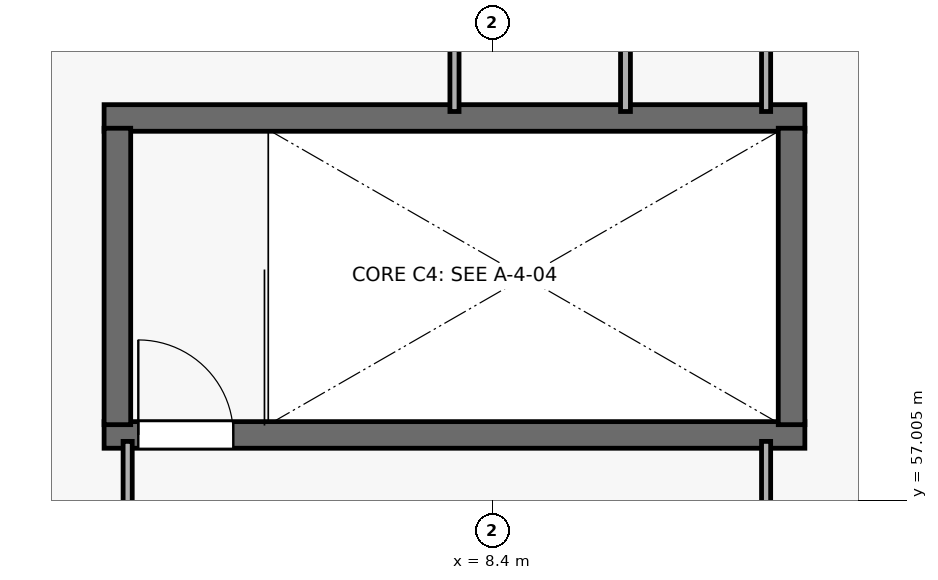
"""IFC4 building model, lengths in metres.
Left out: names, types, materials, properties, quantities, classifications, styles, units other than length and angle.
Written with IfcOpenShell. Run it as: python <this file> out.ifc"""

import sys

from ifc_helpers import new_model, si_unit, direction, frame, frame_2d, origin, place, context, subcontext, project, spatial, rectangle, extrude, element, fill, save


model = new_model("IFC4")
c1 = context("Model", 3, precision=1e-05, world=origin(), true_north=direction((0.0, 1.0)))
c2 = subcontext(c1, "Body", "Model", "MODEL_VIEW")
j1 = project(units=[si_unit("LENGTHUNIT", "METRE"), si_unit("PLANEANGLEUNIT", "RADIAN")], contexts=[c1])
p1 = place(None, origin())
s1 = spatial("IfcSite", under=j1, at=p1, CompositionType="ELEMENT")
p2 = place(p1, origin())
s2 = spatial("IfcBuilding", under=s1, at=p2, CompositionType="ELEMENT")
p3 = place(p2, frame((0.0, 0.0, 25.5)))
s3 = spatial("IfcBuildingStorey", under=s2, at=p3, CompositionType="ELEMENT", Elevation=25.5)
p4 = place(p3, frame((3.29, 57.865, 0.0), z_axis=(0.0, 0.0, 1.0), x_axis=(1.0, 0.0, 0.0)))
e1 = element("IfcWall", 1, at=p4, inside=s3, PredefinedType="SHEAR", context=c2, shape_type="SweptSolid", body=[
    extrude(rectangle(XDim=9.22, YDim=0.35, at=frame_2d((4.61, 0.0))), origin(), (0.0, 0.0, 1.0), 4.82),
])
p5 = place(p4, frame((0.45, 0.0, 0.0)))
e2 = element("IfcOpeningElement", 2, at=p5, cuts=e1, PredefinedType="OPENING", context=c2, shape_type="SweptSolid", body=[
    extrude(rectangle(XDim=1.25, YDim=2.2, at=frame_2d((0.625, 1.1))), frame((0.0, 0.185, 0.0), z_axis=(0.0, -1.0, 0.0), x_axis=(1.0, 0.0, 0.0)), (0.0, 0.0, 1.0), 0.37),
])
p6 = place(p3, frame((12.51, 62.035, 0.0), z_axis=(0.0, 0.0, 1.0), x_axis=(-1.0, 0.0, 0.0)))
e3 = element("IfcWall", 3, at=p6, inside=s3, PredefinedType="SHEAR", context=c2, shape_type="SweptSolid", body=[
    extrude(rectangle(XDim=9.22, YDim=0.35, at=frame_2d((4.61, 0.0))), origin(), (0.0, 0.0, 1.0), 4.82),
])
for number, where, z_axis, x_axis in (
    (4, (3.465, 58.0, 0.0), (0.0, 0.0, 1.0), (0.0, 1.0, 0.0)),
    (5, (12.335, 61.9, 0.0), (0.0, 0.0, 1.0), (0.0, -1.0, 0.0)),
):
    element("IfcWall", number, at=place(p3, frame(where, z_axis=z_axis, x_axis=x_axis)), inside=s3, PredefinedType="SHEAR", context=c2, shape_type="SweptSolid", body=[
        extrude(rectangle(XDim=3.9, YDim=0.35, at=frame_2d((1.95, 0.0))), origin(), (0.0, 0.0, 1.0), 4.82),
    ])
p7 = place(p3, frame((7.9, 81.8, 0.0), z_axis=(0.0, 0.0, 1.0), x_axis=(0.0, -1.0, 0.0)))
e6 = element("IfcWall", 6, at=p7, inside=s3, PredefinedType="PARTITIONING", context=c2, shape_type="SweptSolid", body=[
    extrude(rectangle(XDim=19.68, YDim=0.12, at=frame_2d((9.84, 0.0))), origin(), (0.0, 0.0, 1.0), 4.82),
])
p8 = place(p3, frame((12.0, 62.12, 0.0), z_axis=(0.0, 0.0, 1.0), x_axis=(0.0, 1.0, 0.0)))
e7 = element("IfcWall", 7, at=p8, inside=s3, PredefinedType="PARTITIONING", context=c2, shape_type="SweptSolid", body=[
    extrude(rectangle(XDim=19.68, YDim=0.12, at=frame_2d((9.84, 0.0))), origin(), (0.0, 0.0, 1.0), 4.82),
])
p9 = place(p8, frame((9.18, 0.0, 0.0)))
e8 = element("IfcOpeningElement", 8, at=p9, cuts=e7, PredefinedType="OPENING", context=c2, shape_type="SweptSolid", body=[
    extrude(rectangle(XDim=1.32, YDim=2.24, at=frame_2d((0.66, 1.12))), frame((0.0, 0.07, 0.0), z_axis=(0.0, -1.0, 0.0), x_axis=(1.0, 0.0, 0.0)), (0.0, 0.0, 1.0), 0.14),
])
p10 = place(p3, frame((10.15, 81.8, 0.0), z_axis=(0.0, 0.0, 1.0), x_axis=(0.0, -1.0, 0.0)))
e9 = element("IfcWall", 9, at=p10, inside=s3, PredefinedType="PARTITIONING", context=c2, shape_type="SweptSolid", body=[
    extrude(rectangle(XDim=19.68, YDim=0.13, at=frame_2d((9.84, 0.0))), origin(), (0.0, 0.0, 1.0), 4.82),
])
p11 = place(p10, frame((6.898, 0.0, 0.0)))
e10 = element("IfcOpeningElement", 10, at=p11, cuts=e9, PredefinedType="OPENING", context=c2, shape_type="SweptSolid", body=[
    extrude(rectangle(XDim=1.16, YDim=2.32, at=frame_2d((0.58, 1.16))), frame((0.0, 0.075, 0.0), z_axis=(0.0, -1.0, 0.0), x_axis=(1.0, 0.0, 0.0)), (0.0, 0.0, 1.0), 0.15),
])
p12 = place(p3, frame((3.6, 57.78, 0.0), z_axis=(0.0, 0.0, 1.0), x_axis=(0.0, -1.0, 0.0)))
e11 = element("IfcWall", 11, at=p12, inside=s3, PredefinedType="PARTITIONING", context=c2, shape_type="SweptSolid", body=[
    extrude(rectangle(XDim=5.18, YDim=0.12, at=frame_2d((2.59, 0.0))), origin(), (0.0, 0.0, 1.0), 4.82),
])
p13 = place(p3, frame((12.0, 54.8, 0.0), z_axis=(0.0, 0.0, 1.0), x_axis=(0.0, 1.0, 0.0)))
e12 = element("IfcWall", 12, at=p13, inside=s3, PredefinedType="PARTITIONING", context=c2, shape_type="SweptSolid", body=[
    extrude(rectangle(XDim=2.98, YDim=0.12, at=frame_2d((1.49, 0.0))), origin(), (0.0, 0.0, 1.0), 4.82),
])
p14 = place(p5, origin())
e13 = element("IfcDoor", 13, at=p14, inside=s3, OperationType="SINGLE_SWING_LEFT", PredefinedType="DOOR", context=c2, shape_type="SweptSolid", body=[
    extrude(rectangle(XDim=1.25, YDim=2.2, at=frame_2d((0.625, 1.1))), frame((0.0, 0.025, 0.0), z_axis=(0.0, -1.0, 0.0), x_axis=(1.0, 0.0, 0.0)), (0.0, 0.0, 1.0), 0.05),
])
fill(e2, e13)
save(model, sys.argv[1])
